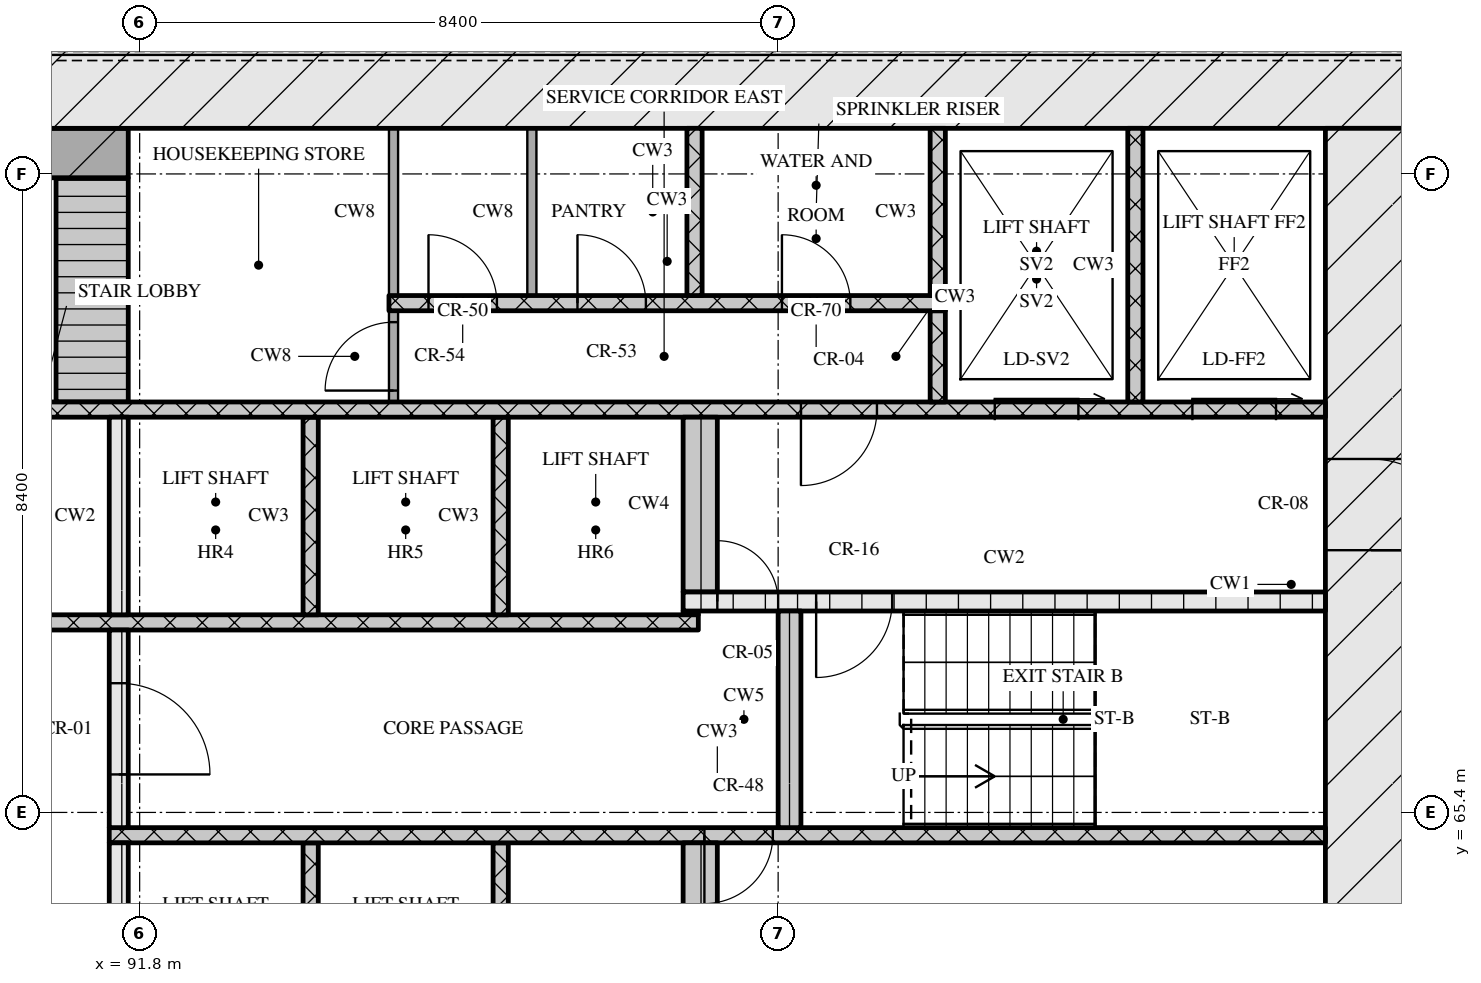
"""IFC4 building model, lengths in metres.
Left out: names, types, materials, properties, quantities, classifications, styles, units other than length and angle.
Written with IfcOpenShell. Run it as: python <this file> out.ifc"""

import sys

from ifc_helpers import new_model, si_unit, direction, frame, frame_2d, origin, place, context, subcontext, project, spatial, rectangle, extrude, element, fill, save


model = new_model("IFC4")
c1 = context("Model", 3, precision=1e-05, world=origin(), true_north=direction((0.0, 1.0)))
c2 = subcontext(c1, "Body", "Model", "MODEL_VIEW")
j1 = project(units=[si_unit("LENGTHUNIT", "METRE"), si_unit("PLANEANGLEUNIT", "RADIAN")], contexts=[c1])
p1 = place(None, origin())
s1 = spatial("IfcSite", under=j1, at=p1, CompositionType="ELEMENT")
p2 = place(p1, origin())
s2 = spatial("IfcBuilding", under=s1, at=p2, CompositionType="ELEMENT")
p3 = place(p2, frame((0.0, 0.0, 62.4)))
s3 = spatial("IfcBuildingStorey", under=s2, at=p3, CompositionType="ELEMENT", Elevation=62.4)
p4 = place(p3, frame((66.6, 75.0, 0.0), z_axis=(0.0, 0.0, 1.0), x_axis=(1.0, 0.0, 0.0)))
e1 = element("IfcWall", 1, at=p4, inside=s3, PredefinedType="SOLIDWALL", context=c2, shape_type="SweptSolid", body=[
    extrude(rectangle(XDim=42.0, YDim=1.2, at=frame_2d((21.0, 0.0))), origin(), (0.0, 0.0, 1.0), 3.32),
])
p5 = place(p3, frame((108.0, 62.4, 0.0), z_axis=(0.0, 0.0, 1.0), x_axis=(0.0, 1.0, 0.0)))
e2 = element("IfcWall", 2, at=p5, inside=s3, PredefinedType="SOLIDWALL", context=c2, shape_type="SweptSolid", body=[
    extrude(rectangle(XDim=12.0, YDim=1.2, at=frame_2d((6.0, 0.0))), origin(), (0.0, 0.0, 1.0), 3.32),
])
p6 = place(p5, frame((6.45, 0.0, 0.0)))
e3 = element("IfcOpeningElement", 3, at=p6, cuts=e2, PredefinedType="OPENING", context=c2, shape_type="SweptSolid", body=[
    extrude(rectangle(XDim=1.2, YDim=2.1, at=frame_2d((0.6, 1.05))), frame((0.0, 0.61, 0.0), z_axis=(0.0, -1.0, 0.0), x_axis=(1.0, 0.0, 0.0)), (0.0, 0.0, 1.0), 1.22),
])
p7 = place(p3, frame((91.525, 62.4, 0.0), z_axis=(0.0, 0.0, 1.0), x_axis=(0.0, 1.0, 0.0)))
e4 = element("IfcWall", 4, at=p7, inside=s3, PredefinedType="SOLIDWALL", context=c2, shape_type="SweptSolid", body=[
    extrude(rectangle(XDim=2.6, YDim=0.25, at=frame_2d((1.3, 0.0))), origin(), (0.0, 0.0, 1.0), 3.32),
])
for number, where, z_axis, x_axis in (
    (5, (94.05, 62.4, 0.0), (0.0, 0.0, 1.0), (0.0, 1.0, 0.0)),
    (6, (96.55, 62.4, 0.0), (0.0, 0.0, 1.0), (0.0, 1.0, 0.0)),
):
    element("IfcWall", number, at=place(p3, frame(where, z_axis=z_axis, x_axis=x_axis)), inside=s3, PredefinedType="SOLIDWALL", context=c2, shape_type="SweptSolid", body=[
        extrude(rectangle(XDim=2.6, YDim=0.2, at=frame_2d((1.3, 0.0))), origin(), (0.0, 0.0, 1.0), 3.32),
    ])
p8 = place(p3, frame((99.175, 62.4, 0.0), z_axis=(0.0, 0.0, 1.0), x_axis=(0.0, 1.0, 0.0)))
e7 = element("IfcWall", 7, at=p8, inside=s3, PredefinedType="SOLIDWALL", context=c2, shape_type="SweptSolid", body=[
    extrude(rectangle(XDim=2.6, YDim=0.45, at=frame_2d((1.3, 0.0))), origin(), (0.0, 0.0, 1.0), 3.32),
])
p9 = place(p3, frame((91.4, 65.1, 0.0), z_axis=(0.0, 0.0, 1.0), x_axis=(1.0, 0.0, 0.0)))
e8 = element("IfcWall", 8, at=p9, inside=s3, PredefinedType="SOLIDWALL", context=c2, shape_type="SweptSolid", body=[
    extrude(rectangle(XDim=16.0, YDim=0.2, at=frame_2d((8.0, 0.0))), origin(), (0.0, 0.0, 1.0), 3.32),
])
p10 = place(p9, frame((7.83, 0.0, 0.0)))
e9 = element("IfcOpeningElement", 9, at=p10, cuts=e8, PredefinedType="OPENING", context=c2, shape_type="SweptSolid", body=[
    extrude(rectangle(XDim=0.9, YDim=2.1, at=frame_2d((0.45, 1.05))), frame((0.0, 0.11, 0.0), z_axis=(0.0, -1.0, 0.0), x_axis=(1.0, 0.0, 0.0)), (0.0, 0.0, 1.0), 0.22),
])
p11 = place(p3, frame((91.525, 65.2, 0.0), z_axis=(0.0, 0.0, 1.0), x_axis=(0.0, 1.0, 0.0)))
e10 = element("IfcWall", 10, at=p11, inside=s3, PredefinedType="SOLIDWALL", context=c2, shape_type="SweptSolid", body=[
    extrude(rectangle(XDim=2.6, YDim=0.25, at=frame_2d((1.3, 0.0))), origin(), (0.0, 0.0, 1.0), 3.32),
])
p12 = place(p11, frame((0.7, 0.0, 0.0)))
e11 = element("IfcOpeningElement", 11, at=p12, cuts=e10, PredefinedType="OPENING", context=c2, shape_type="SweptSolid", body=[
    extrude(rectangle(XDim=1.2, YDim=2.1, at=frame_2d((0.6, 1.05))), frame((0.0, 0.135, 0.0), z_axis=(0.0, -1.0, 0.0), x_axis=(1.0, 0.0, 0.0)), (0.0, 0.0, 1.0), 0.27),
])
p13 = place(p3, frame((100.35, 65.2, 0.0), z_axis=(0.0, 0.0, 1.0), x_axis=(0.0, 1.0, 0.0)))
e12 = element("IfcWall", 12, at=p13, inside=s3, PredefinedType="SOLIDWALL", context=c2, shape_type="SweptSolid", body=[
    extrude(rectangle(XDim=2.85, YDim=0.3, at=frame_2d((1.425, 0.0))), origin(), (0.0, 0.0, 1.0), 3.32),
])
p14 = place(p3, frame((76.05, 67.9, 0.0), z_axis=(0.0, 0.0, 1.0), x_axis=(1.0, 0.0, 0.0)))
e13 = element("IfcWall", 13, at=p14, inside=s3, PredefinedType="SOLIDWALL", context=c2, shape_type="SweptSolid", body=[
    extrude(rectangle(XDim=23.1, YDim=0.2, at=frame_2d((11.55, 0.0))), origin(), (0.0, 0.0, 1.0), 3.32),
])
p15 = place(p14, frame((0.6, 0.0, 0.0)))
e14 = element("IfcOpeningElement", 14, at=p15, cuts=e13, PredefinedType="OPENING", context=c2, shape_type="SweptSolid", body=[
    extrude(rectangle(XDim=1.1, YDim=2.1, at=frame_2d((0.55, 1.05))), frame((0.0, 0.11, 0.0), z_axis=(0.0, -1.0, 0.0), x_axis=(1.0, 0.0, 0.0)), (0.0, 0.0, 1.0), 0.22),
])
p16 = place(p14, frame((3.1, 0.0, 0.0)))
e15 = element("IfcOpeningElement", 15, at=p16, cuts=e13, PredefinedType="OPENING", context=c2, shape_type="SweptSolid", body=[
    extrude(rectangle(XDim=1.1, YDim=2.1, at=frame_2d((0.55, 1.05))), frame((0.0, 0.11, 0.0), z_axis=(0.0, -1.0, 0.0), x_axis=(1.0, 0.0, 0.0)), (0.0, 0.0, 1.0), 0.22),
])
p17 = place(p14, frame((5.6, 0.0, 0.0)))
e16 = element("IfcOpeningElement", 16, at=p17, cuts=e13, PredefinedType="OPENING", context=c2, shape_type="SweptSolid", body=[
    extrude(rectangle(XDim=1.1, YDim=2.1, at=frame_2d((0.55, 1.05))), frame((0.0, 0.11, 0.0), z_axis=(0.0, -1.0, 0.0), x_axis=(1.0, 0.0, 0.0)), (0.0, 0.0, 1.0), 0.22),
])
p18 = place(p14, frame((8.45, 0.0, 0.0)))
e17 = element("IfcOpeningElement", 17, at=p18, cuts=e13, PredefinedType="OPENING", context=c2, shape_type="SweptSolid", body=[
    extrude(rectangle(XDim=0.9, YDim=2.1, at=frame_2d((0.45, 1.05))), frame((0.0, 0.11, 0.0), z_axis=(0.0, -1.0, 0.0), x_axis=(1.0, 0.0, 0.0)), (0.0, 0.0, 1.0), 0.22),
])
p19 = place(p14, frame((10.91, 0.0, 0.0)))
e18 = element("IfcOpeningElement", 18, at=p19, cuts=e13, PredefinedType="OPENING", context=c2, shape_type="SweptSolid", body=[
    extrude(rectangle(XDim=0.9, YDim=2.1, at=frame_2d((0.45, 1.05))), frame((0.0, 0.11, 0.0), z_axis=(0.0, -1.0, 0.0), x_axis=(1.0, 0.0, 0.0)), (0.0, 0.0, 1.0), 0.22),
])
p20 = place(p14, frame((13.55, 0.0, 0.0)))
e19 = element("IfcOpeningElement", 19, at=p20, cuts=e13, PredefinedType="OPENING", context=c2, shape_type="SweptSolid", body=[
    extrude(rectangle(XDim=1.0, YDim=2.1, at=frame_2d((0.5, 1.05))), frame((0.0, 0.11, 0.0), z_axis=(0.0, -1.0, 0.0), x_axis=(1.0, 0.0, 0.0)), (0.0, 0.0, 1.0), 0.22),
])
p21 = place(p3, frame((91.525, 68.0, 0.0), z_axis=(0.0, 0.0, 1.0), x_axis=(0.0, 1.0, 0.0)))
e20 = element("IfcWall", 20, at=p21, inside=s3, PredefinedType="SOLIDWALL", context=c2, shape_type="SweptSolid", body=[
    extrude(rectangle(XDim=2.6, YDim=0.25, at=frame_2d((1.3, 0.0))), origin(), (0.0, 0.0, 1.0), 3.32),
])
for number, where, z_axis, x_axis in (
    (21, (94.05, 68.0, 0.0), (0.0, 0.0, 1.0), (0.0, 1.0, 0.0)),
    (22, (96.55, 68.0, 0.0), (0.0, 0.0, 1.0), (0.0, 1.0, 0.0)),
):
    element("IfcWall", number, at=place(p3, frame(where, z_axis=z_axis, x_axis=x_axis)), inside=s3, PredefinedType="SOLIDWALL", context=c2, shape_type="SweptSolid", body=[
        extrude(rectangle(XDim=2.6, YDim=0.2, at=frame_2d((1.3, 0.0))), origin(), (0.0, 0.0, 1.0), 3.32),
    ])
p22 = place(p3, frame((98.95, 68.025, 0.0), z_axis=(0.0, 0.0, 1.0), x_axis=(1.0, 0.0, 0.0)))
e23 = element("IfcWall", 23, at=p22, inside=s3, PredefinedType="SOLIDWALL", context=c2, shape_type="SweptSolid", body=[
    extrude(rectangle(XDim=0.2, YDim=0.05, at=frame_2d((0.1, 0.0))), origin(), (0.0, 0.0, 1.0), 3.32),
])
p23 = place(p3, frame((98.95, 68.175, 0.0), z_axis=(0.0, 0.0, 1.0), x_axis=(1.0, 0.0, 0.0)))
e24 = element("IfcWall", 24, at=p23, inside=s3, PredefinedType="SOLIDWALL", context=c2, shape_type="SweptSolid", body=[
    extrude(rectangle(XDim=8.45, YDim=0.25, at=frame_2d((4.225, 0.0))), origin(), (0.0, 0.0, 1.0), 3.32),
])
p24 = place(p23, frame((0.45, 0.0, 0.0)))
e25 = element("IfcOpeningElement", 25, at=p24, cuts=e24, PredefinedType="OPENING", context=c2, shape_type="SweptSolid", body=[
    extrude(rectangle(XDim=0.8, YDim=2.1, at=frame_2d((0.4, 1.05))), frame((0.0, 0.135, 0.0), z_axis=(0.0, -1.0, 0.0), x_axis=(1.0, 0.0, 0.0)), (0.0, 0.0, 1.0), 0.27),
])
p25 = place(p23, frame((1.75, 0.0, 0.0)))
e26 = element("IfcOpeningElement", 26, at=p25, cuts=e24, PredefinedType="OPENING", context=c2, shape_type="SweptSolid", body=[
    extrude(rectangle(XDim=1.0, YDim=2.1, at=frame_2d((0.5, 1.05))), frame((0.0, 0.135, 0.0), z_axis=(0.0, -1.0, 0.0), x_axis=(1.0, 0.0, 0.0)), (0.0, 0.0, 1.0), 0.27),
])
p26 = place(p3, frame((99.175, 68.3, 0.0), z_axis=(0.0, 0.0, 1.0), x_axis=(0.0, 1.0, 0.0)))
e27 = element("IfcWall", 27, at=p26, inside=s3, PredefinedType="SOLIDWALL", context=c2, shape_type="SweptSolid", body=[
    extrude(rectangle(XDim=2.3, YDim=0.45, at=frame_2d((1.15, 0.0))), origin(), (0.0, 0.0, 1.0), 3.32),
])
p27 = place(p3, frame((67.8, 70.7, 0.0), z_axis=(0.0, 0.0, 1.0), x_axis=(1.0, 0.0, 0.0)))
e28 = element("IfcWall", 28, at=p27, inside=s3, PredefinedType="SOLIDWALL", context=c2, shape_type="SweptSolid", body=[
    extrude(rectangle(XDim=39.6, YDim=0.2, at=frame_2d((19.8, 0.0))), origin(), (0.0, 0.0, 1.0), 3.32),
])
p28 = place(p27, frame((0.65, 0.0, 0.0)))
e29 = element("IfcOpeningElement", 29, at=p28, cuts=e28, PredefinedType="OPENING", context=c2, shape_type="SweptSolid", body=[
    extrude(rectangle(XDim=1.1, YDim=2.1, at=frame_2d((0.55, 1.05))), frame((0.0, 0.11, 0.0), z_axis=(0.0, -1.0, 0.0), x_axis=(1.0, 0.0, 0.0)), (0.0, 0.0, 1.0), 0.22),
])
p29 = place(p27, frame((3.25, 0.0, 0.0)))
e30 = element("IfcOpeningElement", 30, at=p29, cuts=e28, PredefinedType="OPENING", context=c2, shape_type="SweptSolid", body=[
    extrude(rectangle(XDim=1.1, YDim=2.1, at=frame_2d((0.55, 1.05))), frame((0.0, 0.11, 0.0), z_axis=(0.0, -1.0, 0.0), x_axis=(1.0, 0.0, 0.0)), (0.0, 0.0, 1.0), 0.22),
])
p30 = place(p27, frame((5.9, 0.0, 0.0)))
e31 = element("IfcOpeningElement", 31, at=p30, cuts=e28, PredefinedType="OPENING", context=c2, shape_type="SweptSolid", body=[
    extrude(rectangle(XDim=1.0, YDim=2.1, at=frame_2d((0.5, 1.05))), frame((0.0, 0.11, 0.0), z_axis=(0.0, -1.0, 0.0), x_axis=(1.0, 0.0, 0.0)), (0.0, 0.0, 1.0), 0.22),
])
p31 = place(p27, frame((21.7, 0.0, 0.0)))
e32 = element("IfcOpeningElement", 32, at=p31, cuts=e28, PredefinedType="OPENING", context=c2, shape_type="SweptSolid", body=[
    extrude(rectangle(XDim=1.0, YDim=2.1, at=frame_2d((0.5, 1.05))), frame((0.0, 0.11, 0.0), z_axis=(0.0, -1.0, 0.0), x_axis=(1.0, 0.0, 0.0)), (0.0, 0.0, 1.0), 0.22),
])
p32 = place(p27, frame((32.7, 0.0, 0.0)))
e33 = element("IfcOpeningElement", 33, at=p32, cuts=e28, PredefinedType="OPENING", context=c2, shape_type="SweptSolid", body=[
    extrude(rectangle(XDim=1.0, YDim=2.1, at=frame_2d((0.5, 1.05))), frame((0.0, 0.11, 0.0), z_axis=(0.0, -1.0, 0.0), x_axis=(1.0, 0.0, 0.0)), (0.0, 0.0, 1.0), 0.22),
])
p33 = place(p27, frame((35.25, 0.0, 0.0)))
e34 = element("IfcOpeningElement", 34, at=p33, cuts=e28, PredefinedType="OPENING", context=c2, shape_type="SweptSolid", body=[
    extrude(rectangle(XDim=1.1, YDim=2.1, at=frame_2d((0.55, 1.05))), frame((0.0, 0.11, 0.0), z_axis=(0.0, -1.0, 0.0), x_axis=(1.0, 0.0, 0.0)), (0.0, 0.0, 1.0), 0.22),
])
p34 = place(p27, frame((37.85, 0.0, 0.0)))
e35 = element("IfcOpeningElement", 35, at=p34, cuts=e28, PredefinedType="OPENING", context=c2, shape_type="SweptSolid", body=[
    extrude(rectangle(XDim=1.1, YDim=2.1, at=frame_2d((0.55, 1.05))), frame((0.0, 0.11, 0.0), z_axis=(0.0, -1.0, 0.0), x_axis=(1.0, 0.0, 0.0)), (0.0, 0.0, 1.0), 0.22),
])
p35 = place(p3, frame((91.175, 70.8, 0.0), z_axis=(0.0, 0.0, 1.0), x_axis=(0.0, 1.0, 0.0)))
e36 = element("IfcWall", 36, at=p35, inside=s3, PredefinedType="SOLIDWALL", context=c2, shape_type="SweptSolid", body=[
    extrude(rectangle(XDim=2.95, YDim=0.95, at=frame_2d((1.475, 0.0))), origin(), (0.0, 0.0, 1.0), 3.32),
])
p36 = place(p3, frame((95.14, 70.8, 0.0), z_axis=(0.0, 0.0, 1.0), x_axis=(0.0, 1.0, 0.0)))
e37 = element("IfcWall", 37, at=p36, inside=s3, PredefinedType="PARTITIONING", context=c2, shape_type="SweptSolid", body=[
    extrude(rectangle(XDim=1.2, YDim=0.12, at=frame_2d((0.6, 0.0))), origin(), (0.0, 0.0, 1.0), 3.32),
])
p37 = place(p36, frame((0.15, 0.0, 0.0)))
e38 = element("IfcOpeningElement", 38, at=p37, cuts=e37, PredefinedType="OPENING", context=c2, shape_type="SweptSolid", body=[
    extrude(rectangle(XDim=0.9, YDim=2.1, at=frame_2d((0.45, 1.05))), frame((0.0, 0.07, 0.0), z_axis=(0.0, -1.0, 0.0), x_axis=(1.0, 0.0, 0.0)), (0.0, 0.0, 1.0), 0.14),
])
p38 = place(p3, frame((102.3, 70.8, 0.0), z_axis=(0.0, 0.0, 1.0), x_axis=(0.0, 1.0, 0.0)))
e39 = element("IfcWall", 39, at=p38, inside=s3, PredefinedType="SOLIDWALL", context=c2, shape_type="SweptSolid", body=[
    extrude(rectangle(XDim=1.2, YDim=0.2, at=frame_2d((0.6, 0.0))), origin(), (0.0, 0.0, 1.0), 3.32),
])
p39 = place(p3, frame((104.9, 70.8, 0.0), z_axis=(0.0, 0.0, 1.0), x_axis=(0.0, 1.0, 0.0)))
e40 = element("IfcWall", 40, at=p39, inside=s3, PredefinedType="SOLIDWALL", context=c2, shape_type="SweptSolid", body=[
    extrude(rectangle(XDim=3.6, YDim=0.2, at=frame_2d((1.8, 0.0))), origin(), (0.0, 0.0, 1.0), 3.32),
])
p40 = place(p3, frame((95.08, 72.1, 0.0), z_axis=(0.0, 0.0, 1.0), x_axis=(1.0, 0.0, 0.0)))
e41 = element("IfcWall", 41, at=p40, inside=s3, PredefinedType="SOLIDWALL", context=c2, shape_type="SweptSolid", body=[
    extrude(rectangle(XDim=7.32, YDim=0.2, at=frame_2d((3.66, 0.0))), origin(), (0.0, 0.0, 1.0), 3.32),
])
p41 = place(p40, frame((0.52, 0.0, 0.0)))
e42 = element("IfcOpeningElement", 42, at=p41, cuts=e41, PredefinedType="OPENING", context=c2, shape_type="SweptSolid", body=[
    extrude(rectangle(XDim=0.9, YDim=2.1, at=frame_2d((0.45, 1.05))), frame((0.0, 0.11, 0.0), z_axis=(0.0, -1.0, 0.0), x_axis=(1.0, 0.0, 0.0)), (0.0, 0.0, 1.0), 0.22),
])
p42 = place(p40, frame((2.48, 0.0, 0.0)))
e43 = element("IfcOpeningElement", 43, at=p42, cuts=e41, PredefinedType="OPENING", context=c2, shape_type="SweptSolid", body=[
    extrude(rectangle(XDim=0.9, YDim=2.1, at=frame_2d((0.45, 1.05))), frame((0.0, 0.11, 0.0), z_axis=(0.0, -1.0, 0.0), x_axis=(1.0, 0.0, 0.0)), (0.0, 0.0, 1.0), 0.22),
])
p43 = place(p40, frame((5.17, 0.0, 0.0)))
e44 = element("IfcOpeningElement", 44, at=p43, cuts=e41, PredefinedType="OPENING", context=c2, shape_type="SweptSolid", body=[
    extrude(rectangle(XDim=0.9, YDim=2.1, at=frame_2d((0.45, 1.05))), frame((0.0, 0.11, 0.0), z_axis=(0.0, -1.0, 0.0), x_axis=(1.0, 0.0, 0.0)), (0.0, 0.0, 1.0), 0.22),
])
for number, where, z_axis, x_axis in (
    (45, (95.14, 72.2, 0.0), (0.0, 0.0, 1.0), (0.0, 1.0, 0.0)),
    (46, (96.96, 72.2, 0.0), (0.0, 0.0, 1.0), (0.0, 1.0, 0.0)),
):
    element("IfcWall", number, at=place(p3, frame(where, z_axis=z_axis, x_axis=x_axis)), inside=s3, PredefinedType="PARTITIONING", context=c2, shape_type="SweptSolid", body=[
        extrude(rectangle(XDim=2.2, YDim=0.12, at=frame_2d((1.1, 0.0))), origin(), (0.0, 0.0, 1.0), 3.32),
    ])
for number, where, z_axis, x_axis in (
    (47, (99.1, 72.2, 0.0), (0.0, 0.0, 1.0), (0.0, 1.0, 0.0)),
    (48, (102.3, 72.2, 0.0), (0.0, 0.0, 1.0), (0.0, 1.0, 0.0)),
):
    element("IfcWall", number, at=place(p3, frame(where, z_axis=z_axis, x_axis=x_axis)), inside=s3, PredefinedType="SOLIDWALL", context=c2, shape_type="SweptSolid", body=[
        extrude(rectangle(XDim=2.2, YDim=0.2, at=frame_2d((1.1, 0.0))), origin(), (0.0, 0.0, 1.0), 3.32),
    ])
p44 = place(p3, frame((83.55, 74.075, 0.0), z_axis=(0.0, 0.0, 1.0), x_axis=(1.0, 0.0, 0.0)))
e49 = element("IfcWall", 49, at=p44, inside=s3, PredefinedType="SOLIDWALL", context=c2, shape_type="SweptSolid", body=[
    extrude(rectangle(XDim=8.1, YDim=0.65, at=frame_2d((4.05, 0.0))), origin(), (0.0, 0.0, 1.0), 3.32),
])
p45 = place(p10, origin())
e50 = element("IfcDoor", 50, at=p45, inside=s3, OperationType="SINGLE_SWING_RIGHT", PredefinedType="DOOR", context=c2, shape_type="SweptSolid", body=[
    extrude(rectangle(XDim=0.9, YDim=2.1, at=frame_2d((0.45, 1.05))), frame((0.0, 0.025, 0.0), z_axis=(0.0, -1.0, 0.0), x_axis=(1.0, 0.0, 0.0)), (0.0, 0.0, 1.0), 0.05),
])
fill(e9, e50)
p46 = place(p12, origin())
e51 = element("IfcDoor", 51, at=p46, inside=s3, OperationType="SINGLE_SWING_RIGHT", PredefinedType="DOOR", context=c2, shape_type="SweptSolid", body=[
    extrude(rectangle(XDim=1.2, YDim=2.1, at=frame_2d((0.6, 1.05))), frame((0.0, 0.025, 0.0), z_axis=(0.0, -1.0, 0.0), x_axis=(1.0, 0.0, 0.0)), (0.0, 0.0, 1.0), 0.05),
])
fill(e11, e51)
p47 = place(p24, origin())
e52 = element("IfcDoor", 52, at=p47, inside=s3, OperationType="SINGLE_SWING_LEFT", PredefinedType="DOOR", context=c2, shape_type="SweptSolid", body=[
    extrude(rectangle(XDim=0.8, YDim=2.1, at=frame_2d((0.4, 1.05))), frame((0.0, 0.025, 0.0), z_axis=(0.0, -1.0, 0.0), x_axis=(1.0, 0.0, 0.0)), (0.0, 0.0, 1.0), 0.05),
])
fill(e25, e52)
p48 = place(p25, origin())
e53 = element("IfcDoor", 53, at=p48, inside=s3, OperationType="SINGLE_SWING_RIGHT", PredefinedType="DOOR", context=c2, shape_type="SweptSolid", body=[
    extrude(rectangle(XDim=1.0, YDim=2.1, at=frame_2d((0.5, 1.05))), frame((0.0, 0.025, 0.0), z_axis=(0.0, -1.0, 0.0), x_axis=(1.0, 0.0, 0.0)), (0.0, 0.0, 1.0), 0.05),
])
fill(e26, e53)
p49 = place(p6, origin())
e54 = element("IfcDoor", 54, at=p49, inside=s3, OperationType="SINGLE_SWING_RIGHT", PredefinedType="DOOR", context=c2, shape_type="SweptSolid", body=[
    extrude(rectangle(XDim=1.2, YDim=2.1, at=frame_2d((0.6, 1.05))), frame((0.0, 0.025, 0.0), z_axis=(0.0, -1.0, 0.0), x_axis=(1.0, 0.0, 0.0)), (0.0, 0.0, 1.0), 0.05),
])
fill(e3, e54)
p50 = place(p32, origin())
e55 = element("IfcDoor", 55, at=p50, inside=s3, OperationType="SINGLE_SWING_RIGHT", PredefinedType="DOOR", context=c2, shape_type="SweptSolid", body=[
    extrude(rectangle(XDim=1.0, YDim=2.1, at=frame_2d((0.5, 1.05))), frame((0.0, 0.025, 0.0), z_axis=(0.0, -1.0, 0.0), x_axis=(1.0, 0.0, 0.0)), (0.0, 0.0, 1.0), 0.05),
])
fill(e33, e55)
p51 = place(p33, origin())
e56 = element("IfcDoor", 56, at=p51, inside=s3, OperationType="SLIDING_TO_RIGHT", PredefinedType="DOOR", context=c2, shape_type="SweptSolid", body=[
    extrude(rectangle(XDim=1.1, YDim=2.1, at=frame_2d((0.55, 1.05))), frame((0.0, 0.025, 0.0), z_axis=(0.0, -1.0, 0.0), x_axis=(1.0, 0.0, 0.0)), (0.0, 0.0, 1.0), 0.05),
])
fill(e34, e56)
p52 = place(p34, origin())
e57 = element("IfcDoor", 57, at=p52, inside=s3, OperationType="SLIDING_TO_RIGHT", PredefinedType="DOOR", context=c2, shape_type="SweptSolid", body=[
    extrude(rectangle(XDim=1.1, YDim=2.1, at=frame_2d((0.55, 1.05))), frame((0.0, 0.025, 0.0), z_axis=(0.0, -1.0, 0.0), x_axis=(1.0, 0.0, 0.0)), (0.0, 0.0, 1.0), 0.05),
])
fill(e35, e57)
p53 = place(p37, origin())
e58 = element("IfcDoor", 58, at=p53, inside=s3, OperationType="SINGLE_SWING_LEFT", PredefinedType="DOOR", context=c2, shape_type="SweptSolid", body=[
    extrude(rectangle(XDim=0.9, YDim=2.1, at=frame_2d((0.45, 1.05))), frame((0.0, 0.025, 0.0), z_axis=(0.0, -1.0, 0.0), x_axis=(1.0, 0.0, 0.0)), (0.0, 0.0, 1.0), 0.05),
])
fill(e38, e58)
p54 = place(p41, origin())
e59 = element("IfcDoor", 59, at=p54, inside=s3, OperationType="SINGLE_SWING_LEFT", PredefinedType="DOOR", context=c2, shape_type="SweptSolid", body=[
    extrude(rectangle(XDim=0.9, YDim=2.1, at=frame_2d((0.45, 1.05))), frame((0.0, 0.025, 0.0), z_axis=(0.0, -1.0, 0.0), x_axis=(1.0, 0.0, 0.0)), (0.0, 0.0, 1.0), 0.05),
])
fill(e42, e59)
p55 = place(p42, origin())
e60 = element("IfcDoor", 60, at=p55, inside=s3, OperationType="SINGLE_SWING_LEFT", PredefinedType="DOOR", context=c2, shape_type="SweptSolid", body=[
    extrude(rectangle(XDim=0.9, YDim=2.1, at=frame_2d((0.45, 1.05))), frame((0.0, 0.025, 0.0), z_axis=(0.0, -1.0, 0.0), x_axis=(1.0, 0.0, 0.0)), (0.0, 0.0, 1.0), 0.05),
])
fill(e43, e60)
p56 = place(p43, origin())
e61 = element("IfcDoor", 61, at=p56, inside=s3, OperationType="SINGLE_SWING_LEFT", PredefinedType="DOOR", context=c2, shape_type="SweptSolid", body=[
    extrude(rectangle(XDim=0.9, YDim=2.1, at=frame_2d((0.45, 1.05))), frame((0.0, 0.025, 0.0), z_axis=(0.0, -1.0, 0.0), x_axis=(1.0, 0.0, 0.0)), (0.0, 0.0, 1.0), 0.05),
])
fill(e44, e61)
save(model, sys.argv[1])
